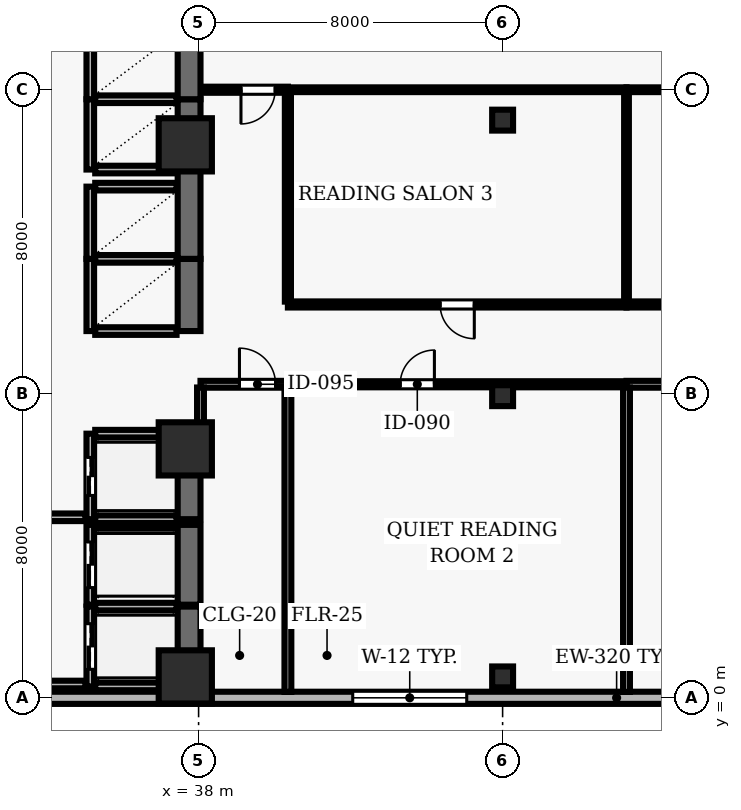
"""IFC4 building model, lengths in metres.
Left out: names, types, materials, properties, quantities, classifications, styles, units other than length and angle.
Written with IfcOpenShell. Run it as: python <this file> out.ifc"""

import sys

from ifc_helpers import new_model, si_unit, direction, frame, frame_2d, origin, origin_2d, place, context, subcontext, project, spatial, rectangle, hollow_rectangle, extrude, element, fill, save


model = new_model("IFC4")
c1 = context("Model", 3, precision=1e-05, world=origin(), true_north=direction((0.0, 1.0)))
c2 = subcontext(c1, "Body", "Model", "MODEL_VIEW")
j1 = project(units=[si_unit("LENGTHUNIT", "METRE"), si_unit("PLANEANGLEUNIT", "RADIAN")], contexts=[c1])
p1 = place(None, origin())
s1 = spatial("IfcSite", under=j1, at=p1, CompositionType="ELEMENT")
p2 = place(p1, origin())
s2 = spatial("IfcBuilding", under=s1, at=p2, CompositionType="ELEMENT")
p3 = place(p2, frame((0.0, 0.0, 50.5)))
s3 = spatial("IfcBuildingStorey", under=s2, at=p3, CompositionType="ELEMENT", Elevation=50.5)
for number, where, z_axis, x_axis in (
    (1, (37.65, 0.55, 0.0), (0.0, 0.0, 1.0), (1.0, 0.0, 0.0)),
    (2, (37.65, 6.55, 0.0), (0.0, 0.0, 1.0), (1.0, 0.0, 0.0)),
    (3, (37.65, 14.55, 0.0), (0.0, 0.0, 1.0), (1.0, 0.0, 0.0)),
):
    element("IfcColumn", number, at=place(p3, frame(where, z_axis=z_axis, x_axis=x_axis)), inside=s3, PredefinedType="COLUMN", context=c2, shape_type="SweptSolid", body=[
        extrude(rectangle(XDim=1.4, YDim=1.4, at=origin_2d()), origin(), (0.0, 0.0, 1.0), 3.9),
    ])
for number, where, z_axis, x_axis in (
    (4, (46.0, 0.55, 0.0), (0.0, 0.0, 1.0), (1.0, 0.0, 0.0)),
    (5, (46.0, 7.95, 0.0), (0.0, 0.0, 1.0), (1.0, 0.0, 0.0)),
    (6, (46.0, 15.2, 0.0), (0.0, 0.0, 1.0), (1.0, 0.0, 0.0)),
):
    element("IfcColumn", number, at=place(p3, frame(where, z_axis=z_axis, x_axis=x_axis)), inside=s3, PredefinedType="COLUMN", context=c2, shape_type="SweptSolid", body=[
        extrude(hollow_rectangle(XDim=0.55, YDim=0.55, WallThickness=0.025, at=origin_2d()), origin(), (0.0, 0.0, 1.0), 3.9),
    ])
p4 = place(p3, frame((24.5, 0.0, 0.0), z_axis=(0.0, 0.0, 1.0), x_axis=(1.0, 0.0, 0.0)))
e7 = element("IfcWall", 7, at=p4, inside=s3, PredefinedType="SOLIDWALL", context=c2, shape_type="SweptSolid", body=[
    extrude(rectangle(XDim=49.0, YDim=0.32, at=frame_2d((24.5, 0.0))), origin(), (0.0, 0.0, 1.0), 3.69),
])
p5 = place(p4, frame((1.222, 0.0, 0.9)))
e8 = element("IfcOpeningElement", 8, at=p5, cuts=e7, PredefinedType="OPENING", context=c2, shape_type="SweptSolid", body=[
    extrude(rectangle(XDim=3.0, YDim=2.2, at=frame_2d((1.5, 1.1))), frame((0.0, 0.17, 0.0), z_axis=(0.0, -1.0, 0.0), x_axis=(1.0, 0.0, 0.0)), (0.0, 0.0, 1.0), 0.34),
])
p6 = place(p4, frame((17.556, 0.0, 0.9)))
e9 = element("IfcOpeningElement", 9, at=p6, cuts=e7, PredefinedType="OPENING", context=c2, shape_type="SweptSolid", body=[
    extrude(rectangle(XDim=3.0, YDim=2.2, at=frame_2d((1.5, 1.1))), frame((0.0, 0.17, 0.0), z_axis=(0.0, -1.0, 0.0), x_axis=(1.0, 0.0, 0.0)), (0.0, 0.0, 1.0), 0.34),
])
p7 = place(p4, frame((28.444, 0.0, 0.9)))
e10 = element("IfcOpeningElement", 10, at=p7, cuts=e7, PredefinedType="OPENING", context=c2, shape_type="SweptSolid", body=[
    extrude(rectangle(XDim=3.0, YDim=2.2, at=frame_2d((1.5, 1.1))), frame((0.0, 0.17, 0.0), z_axis=(0.0, -1.0, 0.0), x_axis=(1.0, 0.0, 0.0)), (0.0, 0.0, 1.0), 0.34),
])
p8 = place(p4, frame((39.333, 0.0, 0.9)))
e11 = element("IfcOpeningElement", 11, at=p8, cuts=e7, PredefinedType="OPENING", context=c2, shape_type="SweptSolid", body=[
    extrude(rectangle(XDim=3.0, YDim=2.2, at=frame_2d((1.5, 1.1))), frame((0.0, 0.17, 0.0), z_axis=(0.0, -1.0, 0.0), x_axis=(1.0, 0.0, 0.0)), (0.0, 0.0, 1.0), 0.34),
])
p9 = place(p4, frame((44.778, 0.0, 0.9)))
e12 = element("IfcOpeningElement", 12, at=p9, cuts=e7, PredefinedType="OPENING", context=c2, shape_type="SweptSolid", body=[
    extrude(rectangle(XDim=3.0, YDim=2.2, at=frame_2d((1.5, 1.1))), frame((0.0, 0.17, 0.0), z_axis=(0.0, -1.0, 0.0), x_axis=(1.0, 0.0, 0.0)), (0.0, 0.0, 1.0), 0.34),
])
p10 = place(p3, frame((35.15, 2.4, 0.0), z_axis=(0.0, 0.0, 1.0), x_axis=(0.0, -1.0, 0.0)))
e13 = element("IfcWall", 13, at=p10, inside=s3, PredefinedType="SOLIDWALL", context=c2, shape_type="SweptSolid", body=[
    extrude(rectangle(XDim=2.1, YDim=0.2, at=frame_2d((1.05, 0.0))), origin(), (0.0, 0.0, 1.0), 3.69),
])
p11 = place(p10, frame((0.45, 0.0, 0.0)))
e14 = element("IfcOpeningElement", 14, at=p11, cuts=e13, PredefinedType="OPENING", context=c2, shape_type="SweptSolid", body=[
    extrude(rectangle(XDim=1.2, YDim=2.15, at=frame_2d((0.6, 1.075))), frame((0.0, 0.11, 0.0), z_axis=(0.0, -1.0, 0.0), x_axis=(1.0, 0.0, 0.0)), (0.0, 0.0, 1.0), 0.22),
])
p12 = place(p3, frame((37.75, 0.3, 0.0), z_axis=(0.0, 0.0, 1.0), x_axis=(0.0, 1.0, 0.0)))
e15 = element("IfcWall", 15, at=p12, inside=s3, PredefinedType="SHEAR", context=c2, shape_type="SweptSolid", body=[
    extrude(rectangle(XDim=2.1, YDim=0.6, at=frame_2d((1.05, 0.0))), origin(), (0.0, 0.0, 1.0), 3.69),
])
for number, where, z_axis, x_axis in (
    (16, (35.28, 0.3, 0.0), (0.0, 0.0, 1.0), (1.0, 0.0, 0.0)),
    (17, (37.42, 2.4, 0.0), (0.0, 0.0, 1.0), (-1.0, 0.0, 0.0)),
):
    element("IfcWall", number, at=place(p3, frame(where, z_axis=z_axis, x_axis=x_axis)), inside=s3, PredefinedType="SOLIDWALL", context=c2, shape_type="SweptSolid", body=[
        extrude(rectangle(XDim=2.14, YDim=0.2, at=frame_2d((1.07, 0.0))), origin(), (0.0, 0.0, 1.0), 3.69),
    ])
p13 = place(p3, frame((35.15, 4.55, 0.0), z_axis=(0.0, 0.0, 1.0), x_axis=(0.0, -1.0, 0.0)))
e18 = element("IfcWall", 18, at=p13, inside=s3, PredefinedType="SOLIDWALL", context=c2, shape_type="SweptSolid", body=[
    extrude(rectangle(XDim=2.1, YDim=0.2, at=frame_2d((1.05, 0.0))), origin(), (0.0, 0.0, 1.0), 3.69),
])
p14 = place(p13, frame((0.45, 0.0, 0.0)))
e19 = element("IfcOpeningElement", 19, at=p14, cuts=e18, PredefinedType="OPENING", context=c2, shape_type="SweptSolid", body=[
    extrude(rectangle(XDim=1.2, YDim=2.15, at=frame_2d((0.6, 1.075))), frame((0.0, 0.11, 0.0), z_axis=(0.0, -1.0, 0.0), x_axis=(1.0, 0.0, 0.0)), (0.0, 0.0, 1.0), 0.22),
])
p15 = place(p3, frame((37.75, 2.45, 0.0), z_axis=(0.0, 0.0, 1.0), x_axis=(0.0, 1.0, 0.0)))
e20 = element("IfcWall", 20, at=p15, inside=s3, PredefinedType="SHEAR", context=c2, shape_type="SweptSolid", body=[
    extrude(rectangle(XDim=2.1, YDim=0.6, at=frame_2d((1.05, 0.0))), origin(), (0.0, 0.0, 1.0), 3.69),
])
p16 = place(p3, frame((37.42, 4.55, 0.0), z_axis=(0.0, 0.0, 1.0), x_axis=(-1.0, 0.0, 0.0)))
e21 = element("IfcWall", 21, at=p16, inside=s3, PredefinedType="SOLIDWALL", context=c2, shape_type="SweptSolid", body=[
    extrude(rectangle(XDim=2.14, YDim=0.2, at=frame_2d((1.07, 0.0))), origin(), (0.0, 0.0, 1.0), 3.69),
])
p17 = place(p3, frame((35.15, 6.95, 0.0), z_axis=(0.0, 0.0, 1.0), x_axis=(0.0, -1.0, 0.0)))
e22 = element("IfcWall", 22, at=p17, inside=s3, PredefinedType="SOLIDWALL", context=c2, shape_type="SweptSolid", body=[
    extrude(rectangle(XDim=2.25, YDim=0.2, at=frame_2d((1.125, 0.0))), origin(), (0.0, 0.0, 1.0), 3.69),
])
p18 = place(p17, frame((0.625, 0.0, 0.0)))
e23 = element("IfcOpeningElement", 23, at=p18, cuts=e22, PredefinedType="OPENING", context=c2, shape_type="SweptSolid", body=[
    extrude(rectangle(XDim=1.0, YDim=2.1, at=frame_2d((0.5, 1.05))), frame((0.0, 0.11, 0.0), z_axis=(0.0, -1.0, 0.0), x_axis=(1.0, 0.0, 0.0)), (0.0, 0.0, 1.0), 0.22),
])
p19 = place(p3, frame((37.75, 4.7, 0.0), z_axis=(0.0, 0.0, 1.0), x_axis=(0.0, 1.0, 0.0)))
e24 = element("IfcWall", 24, at=p19, inside=s3, PredefinedType="SHEAR", context=c2, shape_type="SweptSolid", body=[
    extrude(rectangle(XDim=2.25, YDim=0.6, at=frame_2d((1.125, 0.0))), origin(), (0.0, 0.0, 1.0), 3.69),
])
for number, where, z_axis, x_axis in (
    (25, (35.28, 4.7, 0.0), (0.0, 0.0, 1.0), (1.0, 0.0, 0.0)),
    (26, (37.42, 6.95, 0.0), (0.0, 0.0, 1.0), (-1.0, 0.0, 0.0)),
):
    element("IfcWall", number, at=place(p3, frame(where, z_axis=z_axis, x_axis=x_axis)), inside=s3, PredefinedType="SOLIDWALL", context=c2, shape_type="SweptSolid", body=[
        extrude(rectangle(XDim=2.14, YDim=0.2, at=frame_2d((1.07, 0.0))), origin(), (0.0, 0.0, 1.0), 3.69),
    ])
p20 = place(p3, frame((35.15, 11.55, 0.0), z_axis=(0.0, 0.0, 1.0), x_axis=(0.0, -1.0, 0.0)))
e27 = element("IfcWall", 27, at=p20, inside=s3, PredefinedType="SOLIDWALL", context=c2, shape_type="SweptSolid", body=[
    extrude(rectangle(XDim=1.9, YDim=0.2, at=frame_2d((0.95, 0.0))), origin(), (0.0, 0.0, 1.0), 3.69),
])
p21 = place(p3, frame((37.75, 9.65, 0.0), z_axis=(0.0, 0.0, 1.0), x_axis=(0.0, 1.0, 0.0)))
e28 = element("IfcWall", 28, at=p21, inside=s3, PredefinedType="SHEAR", context=c2, shape_type="SweptSolid", body=[
    extrude(rectangle(XDim=1.9, YDim=0.6, at=frame_2d((0.95, 0.0))), origin(), (0.0, 0.0, 1.0), 3.69),
])
for number, where, z_axis, x_axis in (
    (29, (35.28, 9.65, 0.0), (0.0, 0.0, 1.0), (1.0, 0.0, 0.0)),
    (30, (37.42, 11.55, 0.0), (0.0, 0.0, 1.0), (-1.0, 0.0, 0.0)),
):
    element("IfcWall", number, at=place(p3, frame(where, z_axis=z_axis, x_axis=x_axis)), inside=s3, PredefinedType="SOLIDWALL", context=c2, shape_type="SweptSolid", body=[
        extrude(rectangle(XDim=2.14, YDim=0.2, at=frame_2d((1.07, 0.0))), origin(), (0.0, 0.0, 1.0), 3.69),
    ])
p22 = place(p3, frame((35.15, 13.45, 0.0), z_axis=(0.0, 0.0, 1.0), x_axis=(0.0, -1.0, 0.0)))
e31 = element("IfcWall", 31, at=p22, inside=s3, PredefinedType="SOLIDWALL", context=c2, shape_type="SweptSolid", body=[
    extrude(rectangle(XDim=1.9, YDim=0.2, at=frame_2d((0.95, 0.0))), origin(), (0.0, 0.0, 1.0), 3.69),
])
p23 = place(p3, frame((37.75, 11.55, 0.0), z_axis=(0.0, 0.0, 1.0), x_axis=(0.0, 1.0, 0.0)))
e32 = element("IfcWall", 32, at=p23, inside=s3, PredefinedType="SHEAR", context=c2, shape_type="SweptSolid", body=[
    extrude(rectangle(XDim=2.35, YDim=0.6, at=frame_2d((1.175, 0.0))), origin(), (0.0, 0.0, 1.0), 3.69),
])
p24 = place(p3, frame((37.42, 13.45, 0.0), z_axis=(0.0, 0.0, 1.0), x_axis=(-1.0, 0.0, 0.0)))
e33 = element("IfcWall", 33, at=p24, inside=s3, PredefinedType="SOLIDWALL", context=c2, shape_type="SweptSolid", body=[
    extrude(rectangle(XDim=2.14, YDim=0.2, at=frame_2d((1.07, 0.0))), origin(), (0.0, 0.0, 1.0), 3.69),
])
p25 = place(p3, frame((35.15, 15.75, 0.0), z_axis=(0.0, 0.0, 1.0), x_axis=(0.0, -1.0, 0.0)))
e34 = element("IfcWall", 34, at=p25, inside=s3, PredefinedType="SOLIDWALL", context=c2, shape_type="SweptSolid", body=[
    extrude(rectangle(XDim=1.85, YDim=0.2, at=frame_2d((0.925, 0.0))), origin(), (0.0, 0.0, 1.0), 3.69),
])
p26 = place(p3, frame((37.75, 13.9, 0.0), z_axis=(0.0, 0.0, 1.0), x_axis=(0.0, 1.0, 0.0)))
e35 = element("IfcWall", 35, at=p26, inside=s3, PredefinedType="SHEAR", context=c2, shape_type="SweptSolid", body=[
    extrude(rectangle(XDim=1.85, YDim=0.6, at=frame_2d((0.925, 0.0))), origin(), (0.0, 0.0, 1.0), 3.69),
])
for number, where, z_axis, x_axis in (
    (36, (35.28, 13.9, 0.0), (0.0, 0.0, 1.0), (1.0, 0.0, 0.0)),
    (37, (37.42, 15.75, 0.0), (0.0, 0.0, 1.0), (-1.0, 0.0, 0.0)),
):
    element("IfcWall", number, at=place(p3, frame(where, z_axis=z_axis, x_axis=x_axis)), inside=s3, PredefinedType="SOLIDWALL", context=c2, shape_type="SweptSolid", body=[
        extrude(rectangle(XDim=2.14, YDim=0.2, at=frame_2d((1.07, 0.0))), origin(), (0.0, 0.0, 1.0), 3.69),
    ])
p27 = place(p3, frame((35.15, 17.6, 0.0), z_axis=(0.0, 0.0, 1.0), x_axis=(0.0, -1.0, 0.0)))
e38 = element("IfcWall", 38, at=p27, inside=s3, PredefinedType="SOLIDWALL", context=c2, shape_type="SweptSolid", body=[
    extrude(rectangle(XDim=1.85, YDim=0.2, at=frame_2d((0.925, 0.0))), origin(), (0.0, 0.0, 1.0), 3.69),
])
p28 = place(p3, frame((37.75, 15.75, 0.0), z_axis=(0.0, 0.0, 1.0), x_axis=(0.0, 1.0, 0.0)))
e39 = element("IfcWall", 39, at=p28, inside=s3, PredefinedType="SHEAR", context=c2, shape_type="SweptSolid", body=[
    extrude(rectangle(XDim=1.85, YDim=0.6, at=frame_2d((0.925, 0.0))), origin(), (0.0, 0.0, 1.0), 3.69),
])
p29 = place(p3, frame((31.65, 0.35, 0.0), z_axis=(0.0, 0.0, 1.0), x_axis=(1.0, 0.0, 0.0)))
e40 = element("IfcWall", 40, at=p29, inside=s3, PredefinedType="SOLIDWALL", context=c2, shape_type="SweptSolid", body=[
    extrude(rectangle(XDim=3.37, YDim=0.2, at=frame_2d((1.685, 0.0))), origin(), (0.0, 0.0, 1.0), 3.69),
])
p30 = place(p3, frame((35.02, 4.75, 0.0), z_axis=(0.0, 0.0, 1.0), x_axis=(-1.0, 0.0, 0.0)))
e41 = element("IfcWall", 41, at=p30, inside=s3, PredefinedType="SOLIDWALL", context=c2, shape_type="SweptSolid", body=[
    extrude(rectangle(XDim=3.11, YDim=0.2, at=frame_2d((1.555, 0.0))), origin(), (0.0, 0.0, 1.0), 3.69),
])
p31 = place(p30, frame((1.03, 0.0, 0.0)))
e42 = element("IfcOpeningElement", 42, at=p31, cuts=e41, PredefinedType="OPENING", context=c2, shape_type="SweptSolid", body=[
    extrude(rectangle(XDim=1.05, YDim=2.15, at=frame_2d((0.525, 1.075))), frame((0.0, 0.11, 0.0), z_axis=(0.0, -1.0, 0.0), x_axis=(1.0, 0.0, 0.0)), (0.0, 0.0, 1.0), 0.22),
])
p32 = place(p3, frame((38.05, 8.25, 0.0), z_axis=(0.0, 0.0, 1.0), x_axis=(1.0, 0.0, 0.0)))
e43 = element("IfcWall", 43, at=p32, inside=s3, PredefinedType="PARTITIONING", context=c2, shape_type="SweptSolid", body=[
    extrude(rectangle(XDim=2.3, YDim=0.18, at=frame_2d((1.15, 0.0))), origin(), (0.0, 0.0, 1.0), 3.055),
])
p33 = place(p32, frame((1.025, 0.0, 0.0)))
e44 = element("IfcOpeningElement", 44, at=p33, cuts=e43, PredefinedType="OPENING", context=c2, shape_type="SweptSolid", body=[
    extrude(rectangle(XDim=0.95, YDim=2.1, at=frame_2d((0.475, 1.05))), frame((0.0, 0.1, 0.0), z_axis=(0.0, -1.0, 0.0), x_axis=(1.0, 0.0, 0.0)), (0.0, 0.0, 1.0), 0.2),
])
p34 = place(p3, frame((40.35, 8.25, 0.0), z_axis=(0.0, 0.0, 1.0), x_axis=(1.0, 0.0, 0.0)))
e45 = element("IfcWall", 45, at=p34, inside=s3, PredefinedType="PARTITIONING", context=c2, shape_type="SweptSolid", body=[
    extrude(rectangle(XDim=8.91, YDim=0.16, at=frame_2d((4.455, 0.0))), origin(), (0.0, 0.0, 1.0), 3.055),
])
p35 = place(p34, frame((2.955, 0.0, 0.0)))
e46 = element("IfcOpeningElement", 46, at=p35, cuts=e45, PredefinedType="OPENING", context=c2, shape_type="SweptSolid", body=[
    extrude(rectangle(XDim=0.9, YDim=2.1, at=frame_2d((0.45, 1.05))), frame((0.0, 0.09, 0.0), z_axis=(0.0, -1.0, 0.0), x_axis=(1.0, 0.0, 0.0)), (0.0, 0.0, 1.0), 0.18),
])
p36 = place(p3, frame((40.35, 16.0, 0.0), z_axis=(0.0, 0.0, 1.0), x_axis=(-1.0, 0.0, 0.0)))
e47 = element("IfcWall", 47, at=p36, inside=s3, PredefinedType="PARTITIONING", context=c2, shape_type="SweptSolid", body=[
    extrude(rectangle(XDim=2.27, YDim=0.16, at=frame_2d((1.135, 0.0))), origin(), (0.0, 0.0, 1.0), 3.69),
])
p37 = place(p36, frame((0.335, 0.0, 0.0)))
e48 = element("IfcOpeningElement", 48, at=p37, cuts=e47, PredefinedType="OPENING", context=c2, shape_type="SweptSolid", body=[
    extrude(rectangle(XDim=0.9, YDim=2.1, at=frame_2d((0.45, 1.05))), frame((0.0, 0.09, 0.0), z_axis=(0.0, -1.0, 0.0), x_axis=(1.0, 0.0, 0.0)), (0.0, 0.0, 1.0), 0.18),
])
p38 = place(p3, frame((49.26, 8.25, 0.0), z_axis=(0.0, 0.0, 1.0), x_axis=(1.0, 0.0, 0.0)))
e49 = element("IfcWall", 49, at=p38, inside=s3, PredefinedType="PARTITIONING", context=c2, shape_type="SweptSolid", body=[
    extrude(rectangle(XDim=9.63, YDim=0.18, at=frame_2d((4.815, 0.0))), origin(), (0.0, 0.0, 1.0), 3.055),
])
p39 = place(p38, frame((4.34, 0.0, 0.0)))
e50 = element("IfcOpeningElement", 50, at=p39, cuts=e49, PredefinedType="OPENING", context=c2, shape_type="SweptSolid", body=[
    extrude(rectangle(XDim=0.95, YDim=2.1, at=frame_2d((0.475, 1.05))), frame((0.0, 0.1, 0.0), z_axis=(0.0, -1.0, 0.0), x_axis=(1.0, 0.0, 0.0)), (0.0, 0.0, 1.0), 0.2),
])
p40 = place(p3, frame((49.26, 10.35, 0.0), z_axis=(0.0, 0.0, 1.0), x_axis=(-1.0, 0.0, 0.0)))
e51 = element("IfcWall", 51, at=p40, inside=s3, PredefinedType="PARTITIONING", context=c2, shape_type="SweptSolid", body=[
    extrude(rectangle(XDim=8.91, YDim=0.16, at=frame_2d((4.455, 0.0))), origin(), (0.0, 0.0, 1.0), 3.277),
])
p41 = place(p40, frame((4.005, 0.0, 0.0)))
e52 = element("IfcOpeningElement", 52, at=p41, cuts=e51, PredefinedType="OPENING", context=c2, shape_type="SweptSolid", body=[
    extrude(rectangle(XDim=0.9, YDim=2.1, at=frame_2d((0.45, 1.05))), frame((0.0, 0.09, 0.0), z_axis=(0.0, -1.0, 0.0), x_axis=(1.0, 0.0, 0.0)), (0.0, 0.0, 1.0), 0.18),
])
p42 = place(p3, frame((49.26, 16.0, 0.0), z_axis=(0.0, 0.0, 1.0), x_axis=(1.0, 0.0, 0.0)))
e53 = element("IfcWall", 53, at=p42, inside=s3, PredefinedType="PARTITIONING", context=c2, shape_type="SweptSolid", body=[
    extrude(rectangle(XDim=3.185, YDim=0.125, at=frame_2d((1.593, 0.0))), origin(), (0.0, 0.0, 1.0), 3.39),
])
p43 = place(p3, frame((49.26, 16.0, 0.0), z_axis=(0.0, 0.0, 1.0), x_axis=(-1.0, 0.0, 0.0)))
e54 = element("IfcWall", 54, at=p43, inside=s3, PredefinedType="PARTITIONING", context=c2, shape_type="SweptSolid", body=[
    extrude(rectangle(XDim=8.91, YDim=0.125, at=frame_2d((4.455, 0.0))), origin(), (0.0, 0.0, 1.0), 3.69),
])
p44 = place(p3, frame((58.89, 10.35, 0.0), z_axis=(0.0, 0.0, 1.0), x_axis=(-1.0, 0.0, 0.0)))
e55 = element("IfcWall", 55, at=p44, inside=s3, PredefinedType="PARTITIONING", context=c2, shape_type="SweptSolid", body=[
    extrude(rectangle(XDim=9.63, YDim=0.16, at=frame_2d((4.815, 0.0))), origin(), (0.0, 0.0, 1.0), 3.277),
])
p45 = place(p44, frame((4.365, 0.0, 0.0)))
e56 = element("IfcOpeningElement", 56, at=p45, cuts=e55, PredefinedType="OPENING", context=c2, shape_type="SweptSolid", body=[
    extrude(rectangle(XDim=0.9, YDim=2.1, at=frame_2d((0.45, 1.05))), frame((0.0, 0.09, 0.0), z_axis=(0.0, -1.0, 0.0), x_axis=(1.0, 0.0, 0.0)), (0.0, 0.0, 1.0), 0.18),
])
p46 = place(p3, frame((38.05, 7.05, 0.0), z_axis=(0.0, 0.0, 1.0), x_axis=(0.0, 1.0, 0.0)))
e57 = element("IfcWall", 57, at=p46, inside=s3, PredefinedType="PARTITIONING", context=c2, shape_type="SweptSolid", body=[
    extrude(rectangle(XDim=1.115, YDim=0.18, at=frame_2d((0.558, 0.0))), origin(), (0.0, 0.0, 1.0), 3.055),
])
p47 = place(p3, frame((40.35, 0.155, 0.0), z_axis=(0.0, 0.0, 1.0), x_axis=(0.0, 1.0, 0.0)))
e58 = element("IfcWall", 58, at=p47, inside=s3, PredefinedType="PARTITIONING", context=c2, shape_type="SweptSolid", body=[
    extrude(rectangle(XDim=8.01, YDim=0.18, at=frame_2d((4.005, 0.0))), origin(), (0.0, 0.0, 1.0), 3.69),
])
p48 = place(p3, frame((40.35, 10.425, 0.0), z_axis=(0.0, 0.0, 1.0), x_axis=(0.0, 1.0, 0.0)))
e59 = element("IfcWall", 59, at=p48, inside=s3, PredefinedType="PARTITIONING", context=c2, shape_type="SweptSolid", body=[
    extrude(rectangle(XDim=5.5, YDim=0.16, at=frame_2d((2.75, 0.0))), origin(), (0.0, 0.0, 1.0), 3.277),
])
p49 = place(p3, frame((49.26, 0.155, 0.0), z_axis=(0.0, 0.0, 1.0), x_axis=(0.0, 1.0, 0.0)))
e60 = element("IfcWall", 60, at=p49, inside=s3, PredefinedType="PARTITIONING", context=c2, shape_type="SweptSolid", body=[
    extrude(rectangle(XDim=8.01, YDim=0.18, at=frame_2d((4.005, 0.0))), origin(), (0.0, 0.0, 1.0), 3.69),
])
p50 = place(p3, frame((49.26, 10.425, 0.0), z_axis=(0.0, 0.0, 1.0), x_axis=(0.0, 1.0, 0.0)))
e61 = element("IfcWall", 61, at=p50, inside=s3, PredefinedType="PARTITIONING", context=c2, shape_type="SweptSolid", body=[
    extrude(rectangle(XDim=5.518, YDim=0.125, at=frame_2d((2.759, 0.0))), origin(), (0.0, 0.0, 1.0), 3.69),
])
p51 = place(p6, origin())
e62 = element("IfcWindow", 62, at=p51, inside=s3, PartitioningType="SINGLE_PANEL", PredefinedType="WINDOW", context=c2, shape_type="SweptSolid", body=[
    extrude(rectangle(XDim=3.0, YDim=2.2, at=frame_2d((1.5, 1.1))), frame((0.0, 0.03, 0.0), z_axis=(0.0, -1.0, 0.0), x_axis=(1.0, 0.0, 0.0)), (0.0, 0.0, 1.0), 0.06),
])
fill(e9, e62)
p52 = place(p11, origin())
e63 = element("IfcDoor", 63, at=p52, inside=s3, OperationType="DOUBLE_DOOR_SLIDING", PredefinedType="DOOR", context=c2, shape_type="SweptSolid", body=[
    extrude(rectangle(XDim=1.2, YDim=2.15, at=frame_2d((0.6, 1.075))), frame((0.0, 0.025, 0.0), z_axis=(0.0, -1.0, 0.0), x_axis=(1.0, 0.0, 0.0)), (0.0, 0.0, 1.0), 0.05),
])
fill(e14, e63)
p53 = place(p14, origin())
e64 = element("IfcDoor", 64, at=p53, inside=s3, OperationType="DOUBLE_DOOR_SLIDING", PredefinedType="DOOR", context=c2, shape_type="SweptSolid", body=[
    extrude(rectangle(XDim=1.2, YDim=2.15, at=frame_2d((0.6, 1.075))), frame((0.0, 0.025, 0.0), z_axis=(0.0, -1.0, 0.0), x_axis=(1.0, 0.0, 0.0)), (0.0, 0.0, 1.0), 0.05),
])
fill(e19, e64)
p54 = place(p18, origin())
e65 = element("IfcDoor", 65, at=p54, inside=s3, OperationType="DOUBLE_DOOR_SLIDING", PredefinedType="DOOR", context=c2, shape_type="SweptSolid", body=[
    extrude(rectangle(XDim=1.0, YDim=2.1, at=frame_2d((0.5, 1.05))), frame((0.0, 0.025, 0.0), z_axis=(0.0, -1.0, 0.0), x_axis=(1.0, 0.0, 0.0)), (0.0, 0.0, 1.0), 0.05),
])
fill(e23, e65)
p55 = place(p33, origin())
e66 = element("IfcDoor", 66, at=p55, inside=s3, OperationType="SINGLE_SWING_LEFT", PredefinedType="DOOR", context=c2, shape_type="SweptSolid", body=[
    extrude(rectangle(XDim=0.95, YDim=2.1, at=frame_2d((0.475, 1.05))), frame((0.0, 0.025, 0.0), z_axis=(0.0, -1.0, 0.0), x_axis=(1.0, 0.0, 0.0)), (0.0, 0.0, 1.0), 0.05),
])
fill(e44, e66)
p56 = place(p35, origin())
e67 = element("IfcDoor", 67, at=p56, inside=s3, OperationType="SINGLE_SWING_RIGHT", PredefinedType="DOOR", context=c2, shape_type="SweptSolid", body=[
    extrude(rectangle(XDim=0.9, YDim=2.1, at=frame_2d((0.45, 1.05))), frame((0.0, 0.025, 0.0), z_axis=(0.0, -1.0, 0.0), x_axis=(1.0, 0.0, 0.0)), (0.0, 0.0, 1.0), 0.05),
])
fill(e46, e67)
p57 = place(p41, origin())
e68 = element("IfcDoor", 68, at=p57, inside=s3, OperationType="SINGLE_SWING_LEFT", PredefinedType="DOOR", context=c2, shape_type="SweptSolid", body=[
    extrude(rectangle(XDim=0.9, YDim=2.1, at=frame_2d((0.45, 1.05))), frame((0.0, 0.025, 0.0), z_axis=(0.0, -1.0, 0.0), x_axis=(1.0, 0.0, 0.0)), (0.0, 0.0, 1.0), 0.05),
])
fill(e52, e68)
p58 = place(p37, origin())
e69 = element("IfcDoor", 69, at=p58, inside=s3, OperationType="SINGLE_SWING_RIGHT", PredefinedType="DOOR", context=c2, shape_type="SweptSolid", body=[
    extrude(rectangle(XDim=0.9, YDim=2.1, at=frame_2d((0.45, 1.05))), frame((0.0, 0.025, 0.0), z_axis=(0.0, -1.0, 0.0), x_axis=(1.0, 0.0, 0.0)), (0.0, 0.0, 1.0), 0.05),
])
fill(e48, e69)
save(model, sys.argv[1])
